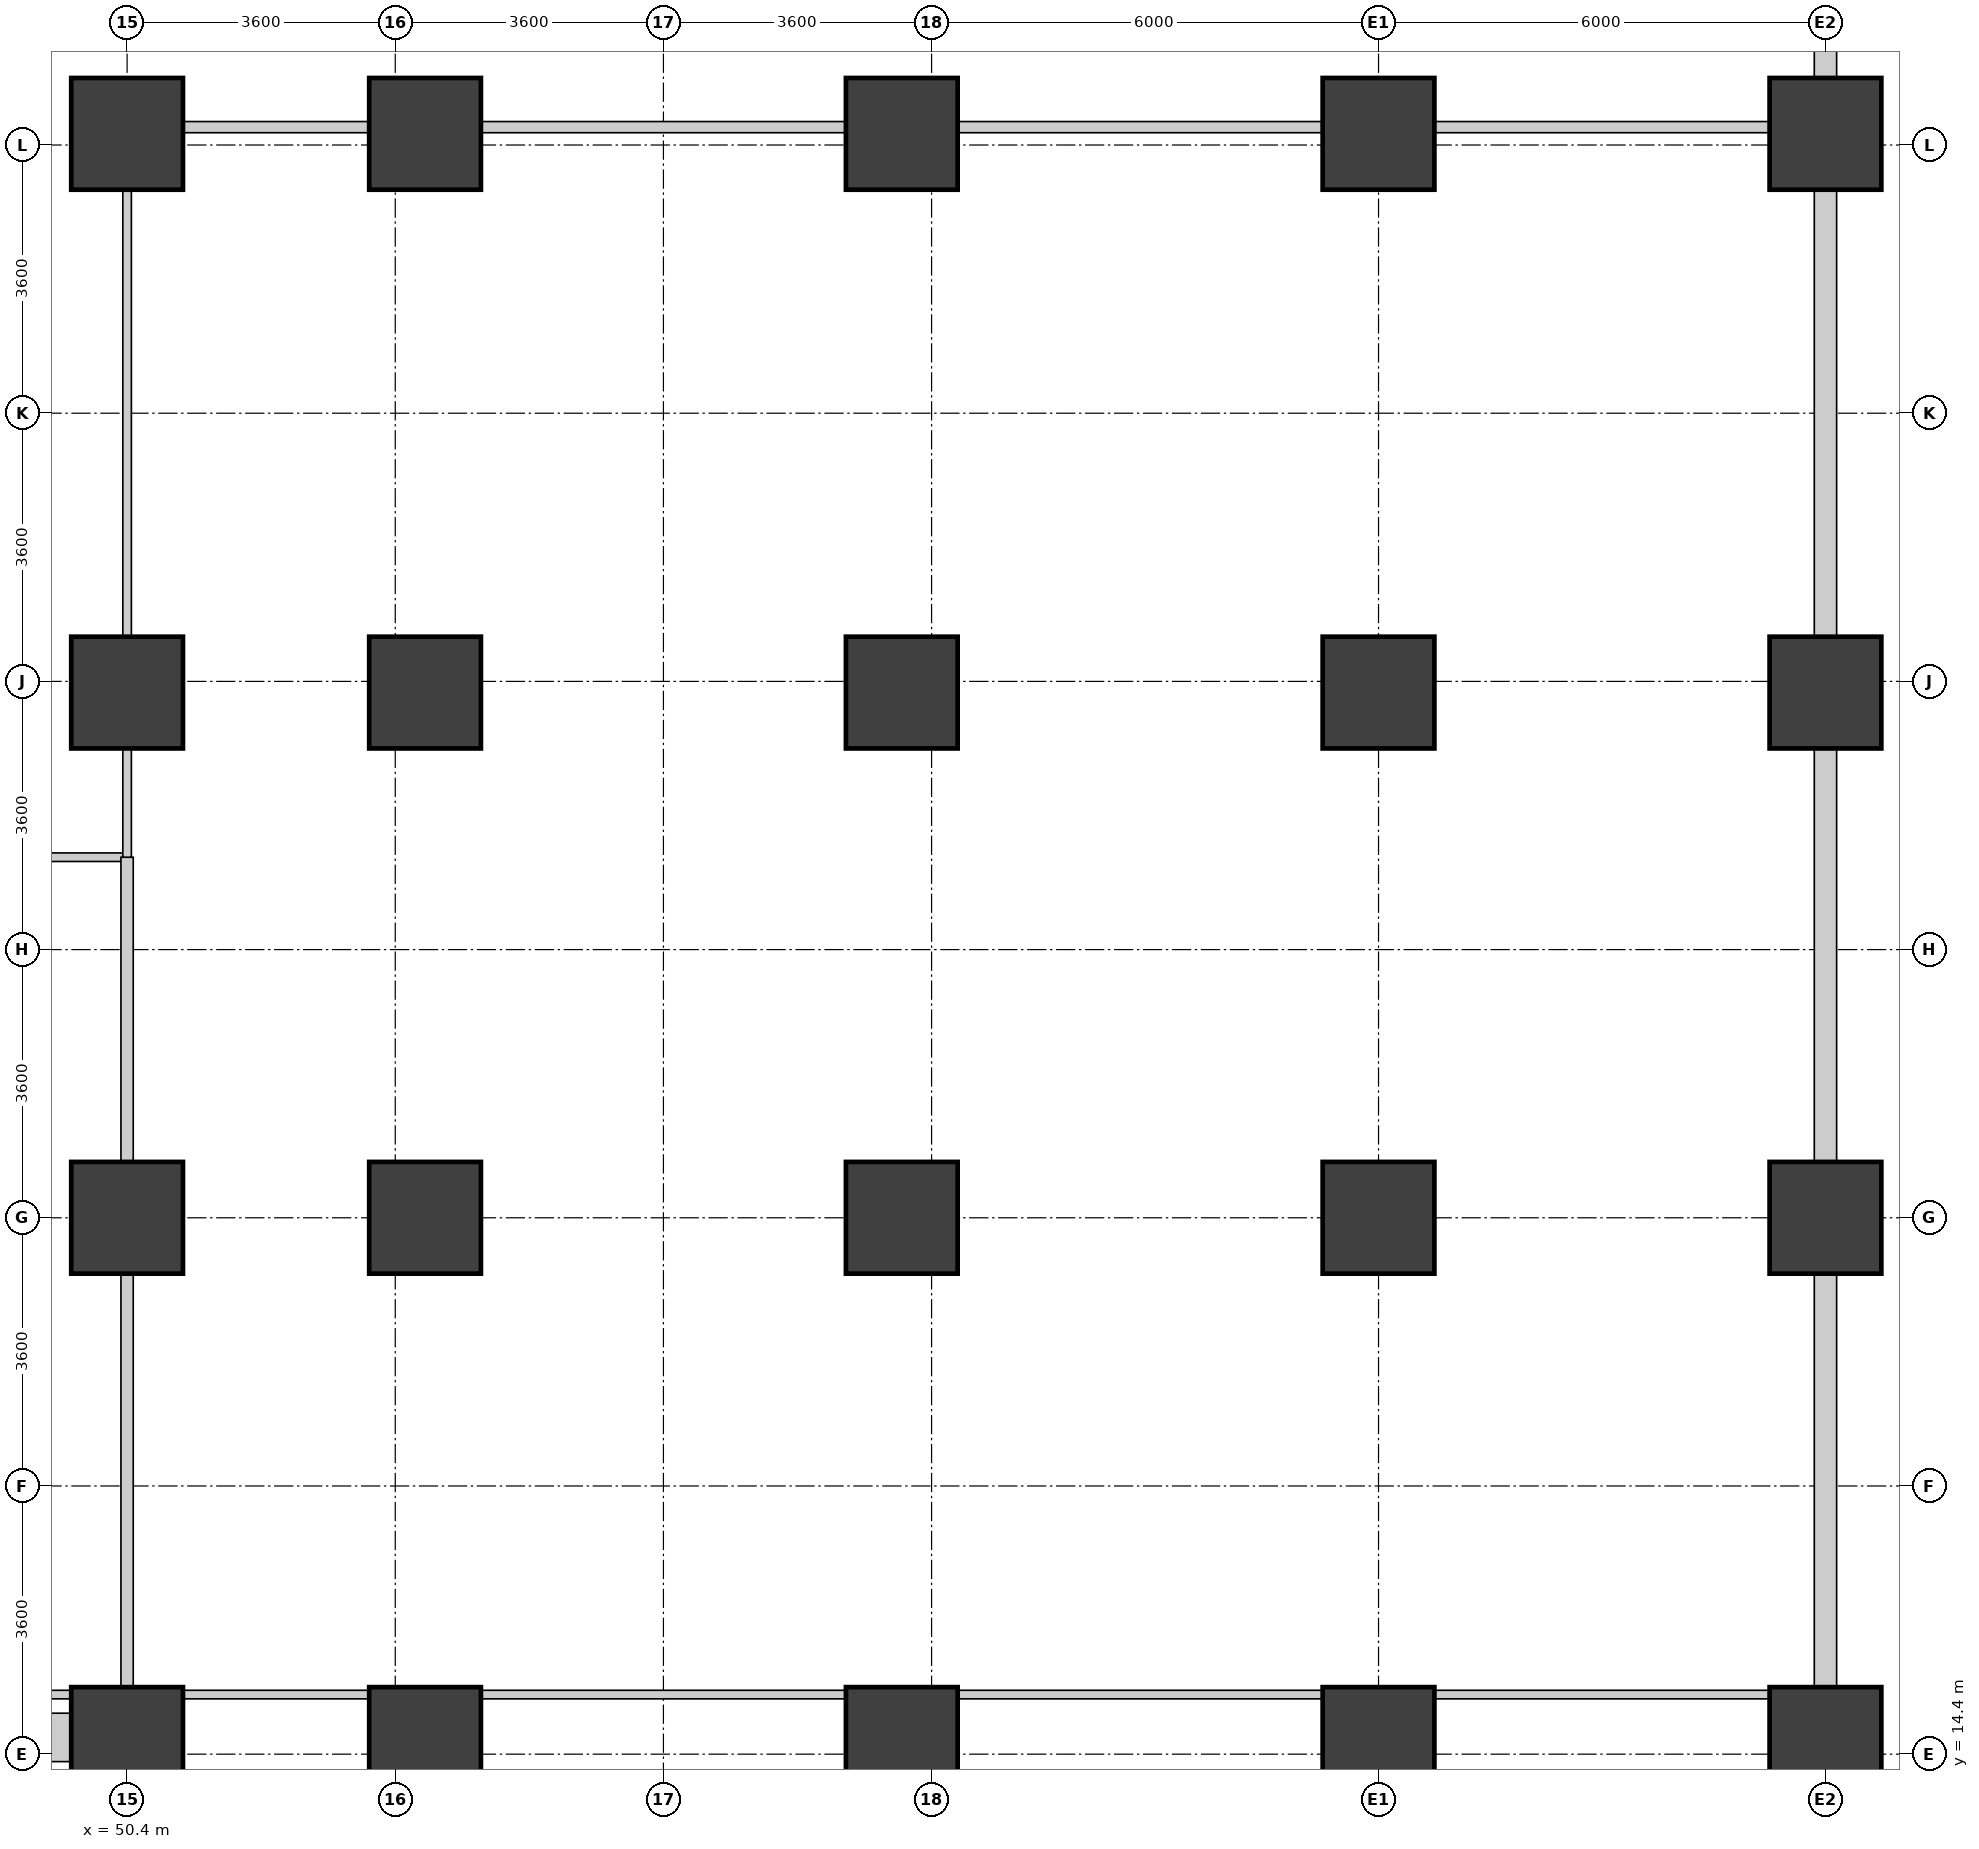
"""IFC4 building model, lengths in metres.
Left out: names, types, materials, properties, quantities, classifications, styles, units other than length and angle.
Written with IfcOpenShell. Run it as: python <this file> out.ifc"""

import sys

from ifc_helpers import new_model, si_unit, direction, frame, frame_2d, origin, origin_2d, place, context, subcontext, project, spatial, rectangle, extrude, source, transform, mapped, element, fill, save


model = new_model("IFC4")
c1 = context("Model", 3, precision=1e-05, world=origin(), true_north=direction((0.0, 1.0)))
c2 = subcontext(c1, "Body", "Model", "MODEL_VIEW")
j1 = project(units=[si_unit("LENGTHUNIT", "METRE"), si_unit("PLANEANGLEUNIT", "RADIAN")], contexts=[c1])
p1 = place(None, origin())
s1 = spatial("IfcSite", under=j1, at=p1, CompositionType="ELEMENT")
p2 = place(p1, origin())
s2 = spatial("IfcBuilding", under=s1, at=p2, CompositionType="ELEMENT")
p3 = place(p2, origin())
s3 = spatial("IfcBuildingStorey", under=s2, at=p3, CompositionType="ELEMENT", Elevation=0.0)
p4 = place(p3, frame((50.375, 6.65, 0.0), z_axis=(0.0, 0.0, 1.0), x_axis=(0.0, 1.0, 0.0)))
e1 = element("IfcWall", 1, at=p4, inside=s3, PredefinedType="SHEAR", context=c2, shape_type="SweptSolid", body=[
    extrude(rectangle(XDim=8.3, YDim=0.65, at=frame_2d((4.15, 0.0))), origin(), (0.0, 0.0, 1.0), 5.12),
])
p5 = place(p3, frame((46.85, 14.625, 0.0), z_axis=(0.0, 0.0, 1.0), x_axis=(1.0, 0.0, 0.0)))
e2 = element("IfcWall", 2, at=p5, inside=s3, PredefinedType="SHEAR", context=c2, shape_type="SweptSolid", body=[
    extrude(rectangle(XDim=3.2, YDim=0.65, at=frame_2d((1.6, 0.0))), origin(), (0.0, 0.0, 1.0), 5.12),
])
m1 = source(origin(), c2, "Body", "SweptSolid", [
    extrude(rectangle(XDim=1.5, YDim=1.5, at=origin_2d()), origin(), (0.0, 0.0, 1.0), 5.4),
])
for number, where, z_axis, x_axis in (
    (3, (50.4, 14.55, 0.0), (0.0, 0.0, 1.0), (1.0, 0.0, 0.0)),
    (4, (50.4, 21.6, 0.0), (0.0, 0.0, 1.0), (1.0, 0.0, 0.0)),
    (5, (50.4, 28.65, 0.0), (0.0, 0.0, 1.0), (1.0, 0.0, 0.0)),
    (6, (50.4, 36.15, 0.0), (0.0, 0.0, 1.0), (1.0, 0.0, 0.0)),
    (7, (54.4, 14.55, 0.0), (0.0, 0.0, 1.0), (1.0, 0.0, 0.0)),
    (8, (54.4, 21.6, 0.0), (0.0, 0.0, 1.0), (1.0, 0.0, 0.0)),
    (9, (54.4, 28.65, 0.0), (0.0, 0.0, 1.0), (1.0, 0.0, 0.0)),
    (10, (54.4, 36.15, 0.0), (0.0, 0.0, 1.0), (1.0, 0.0, 0.0)),
    (11, (60.8, 36.15, 0.0), (0.0, 0.0, 1.0), (1.0, 0.0, 0.0)),
    (12, (60.8, 28.65, 0.0), (0.0, 0.0, 1.0), (1.0, 0.0, 0.0)),
    (13, (60.8, 21.6, 0.0), (0.0, 0.0, 1.0), (1.0, 0.0, 0.0)),
    (14, (60.8, 14.55, 0.0), (0.0, 0.0, 1.0), (1.0, 0.0, 0.0)),
    (15, (67.2, 14.55, 0.0), (0.0, 0.0, 1.0), (1.0, 0.0, 0.0)),
    (16, (67.2, 21.6, 0.0), (0.0, 0.0, 1.0), (1.0, 0.0, 0.0)),
    (17, (67.2, 28.65, 0.0), (0.0, 0.0, 1.0), (1.0, 0.0, 0.0)),
    (18, (67.2, 36.15, 0.0), (0.0, 0.0, 1.0), (1.0, 0.0, 0.0)),
    (19, (73.2, 14.55, 0.0), (0.0, 0.0, 1.0), (1.0, 0.0, 0.0)),
    (20, (73.2, 21.6, 0.0), (0.0, 0.0, 1.0), (1.0, 0.0, 0.0)),
    (21, (73.2, 28.65, 0.0), (0.0, 0.0, 1.0), (1.0, 0.0, 0.0)),
    (22, (73.2, 36.15, 0.0), (0.0, 0.0, 1.0), (1.0, 0.0, 0.0)),
):
    element("IfcColumn", number, at=place(p3, frame(where, z_axis=z_axis, x_axis=x_axis)), inside=s3, PredefinedType="COLUMN", context=c2, shape_type="MappedRepresentation", body=[
        mapped(m1, transform((0.0, 0.0, 0.0), x_axis=(1.0, 0.0, 0.0), y_axis=(0.0, 1.0, 0.0), z_axis=(0.0, 0.0, 1.0), scale=1.0)),
    ])
p6 = place(p3, frame((73.2, 20.849, 0.0), z_axis=(0.0, 0.0, 1.0), x_axis=(0.0, -1.0, 0.0)))
e23 = element("IfcWall", 23, at=p6, inside=s3, PredefinedType="STANDARD", context=c2, shape_type="SweptSolid", body=[
    extrude(rectangle(XDim=5.548, YDim=0.3, at=frame_2d((2.774, 0.0))), origin(), (0.0, 0.0, 1.0), 4.5),
])
p7 = place(p6, frame((1.849, 0.0, 0.0)))
e24 = element("IfcOpeningElement", 24, at=p7, cuts=e23, PredefinedType="OPENING", context=c2, shape_type="SweptSolid", body=[
    extrude(rectangle(XDim=1.85, YDim=2.25, at=frame_2d((0.925, 1.125))), frame((0.0, 0.16, 0.0), z_axis=(0.0, -1.0, 0.0), x_axis=(1.0, 0.0, 0.0)), (0.0, 0.0, 1.0), 0.32),
])
p8 = place(p3, frame((73.2, 27.899, 0.0), z_axis=(0.0, 0.0, 1.0), x_axis=(0.0, -1.0, 0.0)))
e25 = element("IfcWall", 25, at=p8, inside=s3, PredefinedType="STANDARD", context=c2, shape_type="SweptSolid", body=[
    extrude(rectangle(XDim=5.548, YDim=0.3, at=frame_2d((2.774, 0.0))), origin(), (0.0, 0.0, 1.0), 4.5),
])
p9 = place(p8, frame((2.299, 0.0, 0.9)))
e26 = element("IfcOpeningElement", 26, at=p9, cuts=e25, PredefinedType="OPENING", context=c2, shape_type="SweptSolid", body=[
    extrude(rectangle(XDim=0.95, YDim=1.75, at=frame_2d((0.475, 0.875))), frame((0.0, 0.16, 0.0), z_axis=(0.0, -1.0, 0.0), x_axis=(1.0, 0.0, 0.0)), (0.0, 0.0, 1.0), 0.32),
])
p10 = place(p8, frame((0.923, 0.0, 0.9)))
e27 = element("IfcOpeningElement", 27, at=p10, cuts=e25, PredefinedType="OPENING", context=c2, shape_type="SweptSolid", body=[
    extrude(rectangle(XDim=0.95, YDim=1.75, at=frame_2d((0.475, 0.875))), frame((0.0, 0.16, 0.0), z_axis=(0.0, -1.0, 0.0), x_axis=(1.0, 0.0, 0.0)), (0.0, 0.0, 1.0), 0.32),
])
p11 = place(p3, frame((73.2, 35.399, 0.0), z_axis=(0.0, 0.0, 1.0), x_axis=(0.0, -1.0, 0.0)))
e28 = element("IfcWall", 28, at=p11, inside=s3, PredefinedType="STANDARD", context=c2, shape_type="SweptSolid", body=[
    extrude(rectangle(XDim=5.998, YDim=0.3, at=frame_2d((2.999, 0.0))), origin(), (0.0, 0.0, 1.0), 4.5),
])
p12 = place(p11, frame((2.524, 0.0, 0.9)))
e29 = element("IfcOpeningElement", 29, at=p12, cuts=e28, PredefinedType="OPENING", context=c2, shape_type="SweptSolid", body=[
    extrude(rectangle(XDim=0.95, YDim=1.75, at=frame_2d((0.475, 0.875))), frame((0.0, 0.16, 0.0), z_axis=(0.0, -1.0, 0.0), x_axis=(1.0, 0.0, 0.0)), (0.0, 0.0, 1.0), 0.32),
])
p13 = place(p11, frame((1.037, 0.0, 0.9)))
e30 = element("IfcOpeningElement", 30, at=p13, cuts=e28, PredefinedType="OPENING", context=c2, shape_type="SweptSolid", body=[
    extrude(rectangle(XDim=0.95, YDim=1.75, at=frame_2d((0.475, 0.875))), frame((0.0, 0.16, 0.0), z_axis=(0.0, -1.0, 0.0), x_axis=(1.0, 0.0, 0.0)), (0.0, 0.0, 1.0), 0.32),
])
p14 = place(p3, frame((73.2, 44.099, 0.0), z_axis=(0.0, 0.0, 1.0), x_axis=(0.0, -1.0, 0.0)))
e31 = element("IfcWall", 31, at=p14, inside=s3, PredefinedType="STANDARD", context=c2, shape_type="SweptSolid", body=[
    extrude(rectangle(XDim=7.198, YDim=0.3, at=frame_2d((3.599, 0.0))), origin(), (0.0, 0.0, 1.0), 4.5),
])
p15 = place(p14, frame((0.6, 0.0, 0.9)))
e32 = element("IfcOpeningElement", 32, at=p15, cuts=e31, PredefinedType="OPENING", context=c2, shape_type="SweptSolid", body=[
    extrude(rectangle(XDim=2.4, YDim=2.5, at=frame_2d((1.2, 1.25))), frame((0.0, 0.16, 0.0), z_axis=(0.0, -1.0, 0.0), x_axis=(1.0, 0.0, 0.0)), (0.0, 0.0, 1.0), 0.32),
])
p16 = place(p14, frame((3.7, 0.0, 0.9)))
e33 = element("IfcOpeningElement", 33, at=p16, cuts=e31, PredefinedType="OPENING", context=c2, shape_type="SweptSolid", body=[
    extrude(rectangle(XDim=0.95, YDim=1.75, at=frame_2d((0.475, 0.875))), frame((0.0, 0.16, 0.0), z_axis=(0.0, -1.0, 0.0), x_axis=(1.0, 0.0, 0.0)), (0.0, 0.0, 1.0), 0.32),
])
p17 = place(p3, frame((51.15, 36.24, 0.0), z_axis=(0.0, 0.0, 1.0), x_axis=(1.0, 0.0, 0.0)))
e34 = element("IfcWall", 34, at=p17, inside=s3, PredefinedType="PARTITIONING", context=c2, shape_type="SweptSolid", body=[
    extrude(rectangle(XDim=2.5, YDim=0.15, at=frame_2d((1.25, 0.0))), origin(), (0.0, 0.0, 1.0), 4.4),
])
p18 = place(p17, frame((0.6, 0.0, 0.0)))
e35 = element("IfcOpeningElement", 35, at=p18, cuts=e34, PredefinedType="OPENING", context=c2, shape_type="SweptSolid", body=[
    extrude(rectangle(XDim=1.3, YDim=2.12, at=frame_2d((0.65, 1.06))), frame((0.0, 0.085, 0.0), z_axis=(0.0, -1.0, 0.0), x_axis=(1.0, 0.0, 0.0)), (0.0, 0.0, 1.0), 0.17),
])
p19 = place(p3, frame((55.15, 36.24, 0.0), z_axis=(0.0, 0.0, 1.0), x_axis=(1.0, 0.0, 0.0)))
e36 = element("IfcWall", 36, at=p19, inside=s3, PredefinedType="PARTITIONING", context=c2, shape_type="SweptSolid", body=[
    extrude(rectangle(XDim=4.9, YDim=0.15, at=frame_2d((2.45, 0.0))), origin(), (0.0, 0.0, 1.0), 4.4),
])
p20 = place(p3, frame((61.55, 36.24, 0.0), z_axis=(0.0, 0.0, 1.0), x_axis=(1.0, 0.0, 0.0)))
e37 = element("IfcWall", 37, at=p20, inside=s3, PredefinedType="PARTITIONING", context=c2, shape_type="SweptSolid", body=[
    extrude(rectangle(XDim=4.9, YDim=0.15, at=frame_2d((2.45, 0.0))), origin(), (0.0, 0.0, 1.0), 4.4),
])
p21 = place(p3, frame((67.95, 36.24, 0.0), z_axis=(0.0, 0.0, 1.0), x_axis=(1.0, 0.0, 0.0)))
e38 = element("IfcWall", 38, at=p21, inside=s3, PredefinedType="PARTITIONING", context=c2, shape_type="SweptSolid", body=[
    extrude(rectangle(XDim=4.5, YDim=0.15, at=frame_2d((2.25, 0.0))), origin(), (0.0, 0.0, 1.0), 4.4),
])
p22 = place(p3, frame((51.15, 15.2, 0.0), z_axis=(0.0, 0.0, 1.0), x_axis=(1.0, 0.0, 0.0)))
e39 = element("IfcWall", 39, at=p22, inside=s3, PredefinedType="PARTITIONING", context=c2, shape_type="SweptSolid", body=[
    extrude(rectangle(XDim=2.5, YDim=0.115, at=frame_2d((1.25, 0.0))), origin(), (0.0, 0.0, 1.0), 5.1),
])
p23 = place(p3, frame((55.15, 15.2, 0.0), z_axis=(0.0, 0.0, 1.0), x_axis=(1.0, 0.0, 0.0)))
e40 = element("IfcWall", 40, at=p23, inside=s3, PredefinedType="PARTITIONING", context=c2, shape_type="SweptSolid", body=[
    extrude(rectangle(XDim=4.9, YDim=0.115, at=frame_2d((2.45, 0.0))), origin(), (0.0, 0.0, 1.0), 5.1),
])
p24 = place(p3, frame((61.55, 15.2, 0.0), z_axis=(0.0, 0.0, 1.0), x_axis=(1.0, 0.0, 0.0)))
e41 = element("IfcWall", 41, at=p24, inside=s3, PredefinedType="PARTITIONING", context=c2, shape_type="SweptSolid", body=[
    extrude(rectangle(XDim=4.9, YDim=0.115, at=frame_2d((2.45, 0.0))), origin(), (0.0, 0.0, 1.0), 5.1),
])
p25 = place(p3, frame((67.95, 15.2, 0.0), z_axis=(0.0, 0.0, 1.0), x_axis=(1.0, 0.0, 0.0)))
e42 = element("IfcWall", 42, at=p25, inside=s3, PredefinedType="PARTITIONING", context=c2, shape_type="SweptSolid", body=[
    extrude(rectangle(XDim=4.5, YDim=0.115, at=frame_2d((2.25, 0.0))), origin(), (0.0, 0.0, 1.0), 5.1),
])
p26 = place(p3, frame((43.95, 15.2, 0.0), z_axis=(0.0, 0.0, 1.0), x_axis=(1.0, 0.0, 0.0)))
e43 = element("IfcWall", 43, at=p26, inside=s3, PredefinedType="PARTITIONING", context=c2, shape_type="SweptSolid", body=[
    extrude(rectangle(XDim=5.7, YDim=0.115, at=frame_2d((2.85, 0.0))), origin(), (0.0, 0.0, 1.0), 5.1),
])
p27 = place(p3, frame((35.4, 26.44, 0.0), z_axis=(0.0, 0.0, 1.0), x_axis=(1.0, 0.0, 0.0)))
e44 = element("IfcWall", 44, at=p27, inside=s3, PredefinedType="PARTITIONING", context=c2, shape_type="SweptSolid", body=[
    extrude(rectangle(XDim=15.0, YDim=0.115, at=frame_2d((7.5, 0.0))), origin(), (0.0, 0.0, 1.0), 5.1),
])
p28 = place(p3, frame((50.4, 15.2, 0.0), z_axis=(0.0, 0.0, 1.0), x_axis=(0.0, 1.0, 0.0)))
e45 = element("IfcWall", 45, at=p28, inside=s3, PredefinedType="PARTITIONING", context=c2, shape_type="SweptSolid", body=[
    extrude(rectangle(XDim=11.24, YDim=0.165, at=frame_2d((5.62, 0.0))), origin(), (0.0, 0.0, 1.0), 4.5),
])
p29 = place(p3, frame((50.4, 26.44, 0.0), z_axis=(0.0, 0.0, 1.0), x_axis=(0.0, 1.0, 0.0)))
e46 = element("IfcWall", 46, at=p29, inside=s3, PredefinedType="PARTITIONING", context=c2, shape_type="SweptSolid", body=[
    extrude(rectangle(XDim=1.46, YDim=0.115, at=frame_2d((0.73, 0.0))), origin(), (0.0, 0.0, 1.0), 5.1),
])
p30 = place(p3, frame((50.4, 29.4, 0.0), z_axis=(0.0, 0.0, 1.0), x_axis=(0.0, 1.0, 0.0)))
e47 = element("IfcWall", 47, at=p30, inside=s3, PredefinedType="PARTITIONING", context=c2, shape_type="SweptSolid", body=[
    extrude(rectangle(XDim=6.0, YDim=0.115, at=frame_2d((3.0, 0.0))), origin(), (0.0, 0.0, 1.0), 5.1),
])
p31 = place(p7, origin())
e48 = element("IfcDoor", 48, at=p31, inside=s3, OperationType="DOUBLE_DOOR_SINGLE_SWING", PredefinedType="DOOR", context=c2, shape_type="SweptSolid", body=[
    extrude(rectangle(XDim=1.85, YDim=2.25, at=frame_2d((0.925, 1.125))), frame((0.0, 0.025, 0.0), z_axis=(0.0, -1.0, 0.0), x_axis=(1.0, 0.0, 0.0)), (0.0, 0.0, 1.0), 0.05),
])
fill(e24, e48)
p32 = place(p9, origin())
e49 = element("IfcWindow", 49, at=p32, inside=s3, PartitioningType="SINGLE_PANEL", PredefinedType="WINDOW", context=c2, shape_type="SweptSolid", body=[
    extrude(rectangle(XDim=0.95, YDim=1.75, at=frame_2d((0.475, 0.875))), frame((0.0, 0.03, 0.0), z_axis=(0.0, -1.0, 0.0), x_axis=(1.0, 0.0, 0.0)), (0.0, 0.0, 1.0), 0.06),
])
fill(e26, e49)
p33 = place(p10, origin())
e50 = element("IfcWindow", 50, at=p33, inside=s3, PartitioningType="SINGLE_PANEL", PredefinedType="WINDOW", context=c2, shape_type="SweptSolid", body=[
    extrude(rectangle(XDim=0.95, YDim=1.75, at=frame_2d((0.475, 0.875))), frame((0.0, 0.03, 0.0), z_axis=(0.0, -1.0, 0.0), x_axis=(1.0, 0.0, 0.0)), (0.0, 0.0, 1.0), 0.06),
])
fill(e27, e50)
p34 = place(p12, origin())
e51 = element("IfcWindow", 51, at=p34, inside=s3, PartitioningType="SINGLE_PANEL", PredefinedType="WINDOW", context=c2, shape_type="SweptSolid", body=[
    extrude(rectangle(XDim=0.95, YDim=1.75, at=frame_2d((0.475, 0.875))), frame((0.0, 0.03, 0.0), z_axis=(0.0, -1.0, 0.0), x_axis=(1.0, 0.0, 0.0)), (0.0, 0.0, 1.0), 0.06),
])
fill(e29, e51)
p35 = place(p13, origin())
e52 = element("IfcWindow", 52, at=p35, inside=s3, PartitioningType="SINGLE_PANEL", PredefinedType="WINDOW", context=c2, shape_type="SweptSolid", body=[
    extrude(rectangle(XDim=0.95, YDim=1.75, at=frame_2d((0.475, 0.875))), frame((0.0, 0.03, 0.0), z_axis=(0.0, -1.0, 0.0), x_axis=(1.0, 0.0, 0.0)), (0.0, 0.0, 1.0), 0.06),
])
fill(e30, e52)
p36 = place(p18, origin())
e53 = element("IfcDoor", 53, at=p36, inside=s3, OperationType="DOUBLE_DOOR_SINGLE_SWING", PredefinedType="DOOR", context=c2, shape_type="SweptSolid", body=[
    extrude(rectangle(XDim=1.3, YDim=2.12, at=frame_2d((0.65, 1.06))), frame((0.0, 0.025, 0.0), z_axis=(0.0, -1.0, 0.0), x_axis=(1.0, 0.0, 0.0)), (0.0, 0.0, 1.0), 0.05),
])
fill(e35, e53)
save(model, sys.argv[1])
